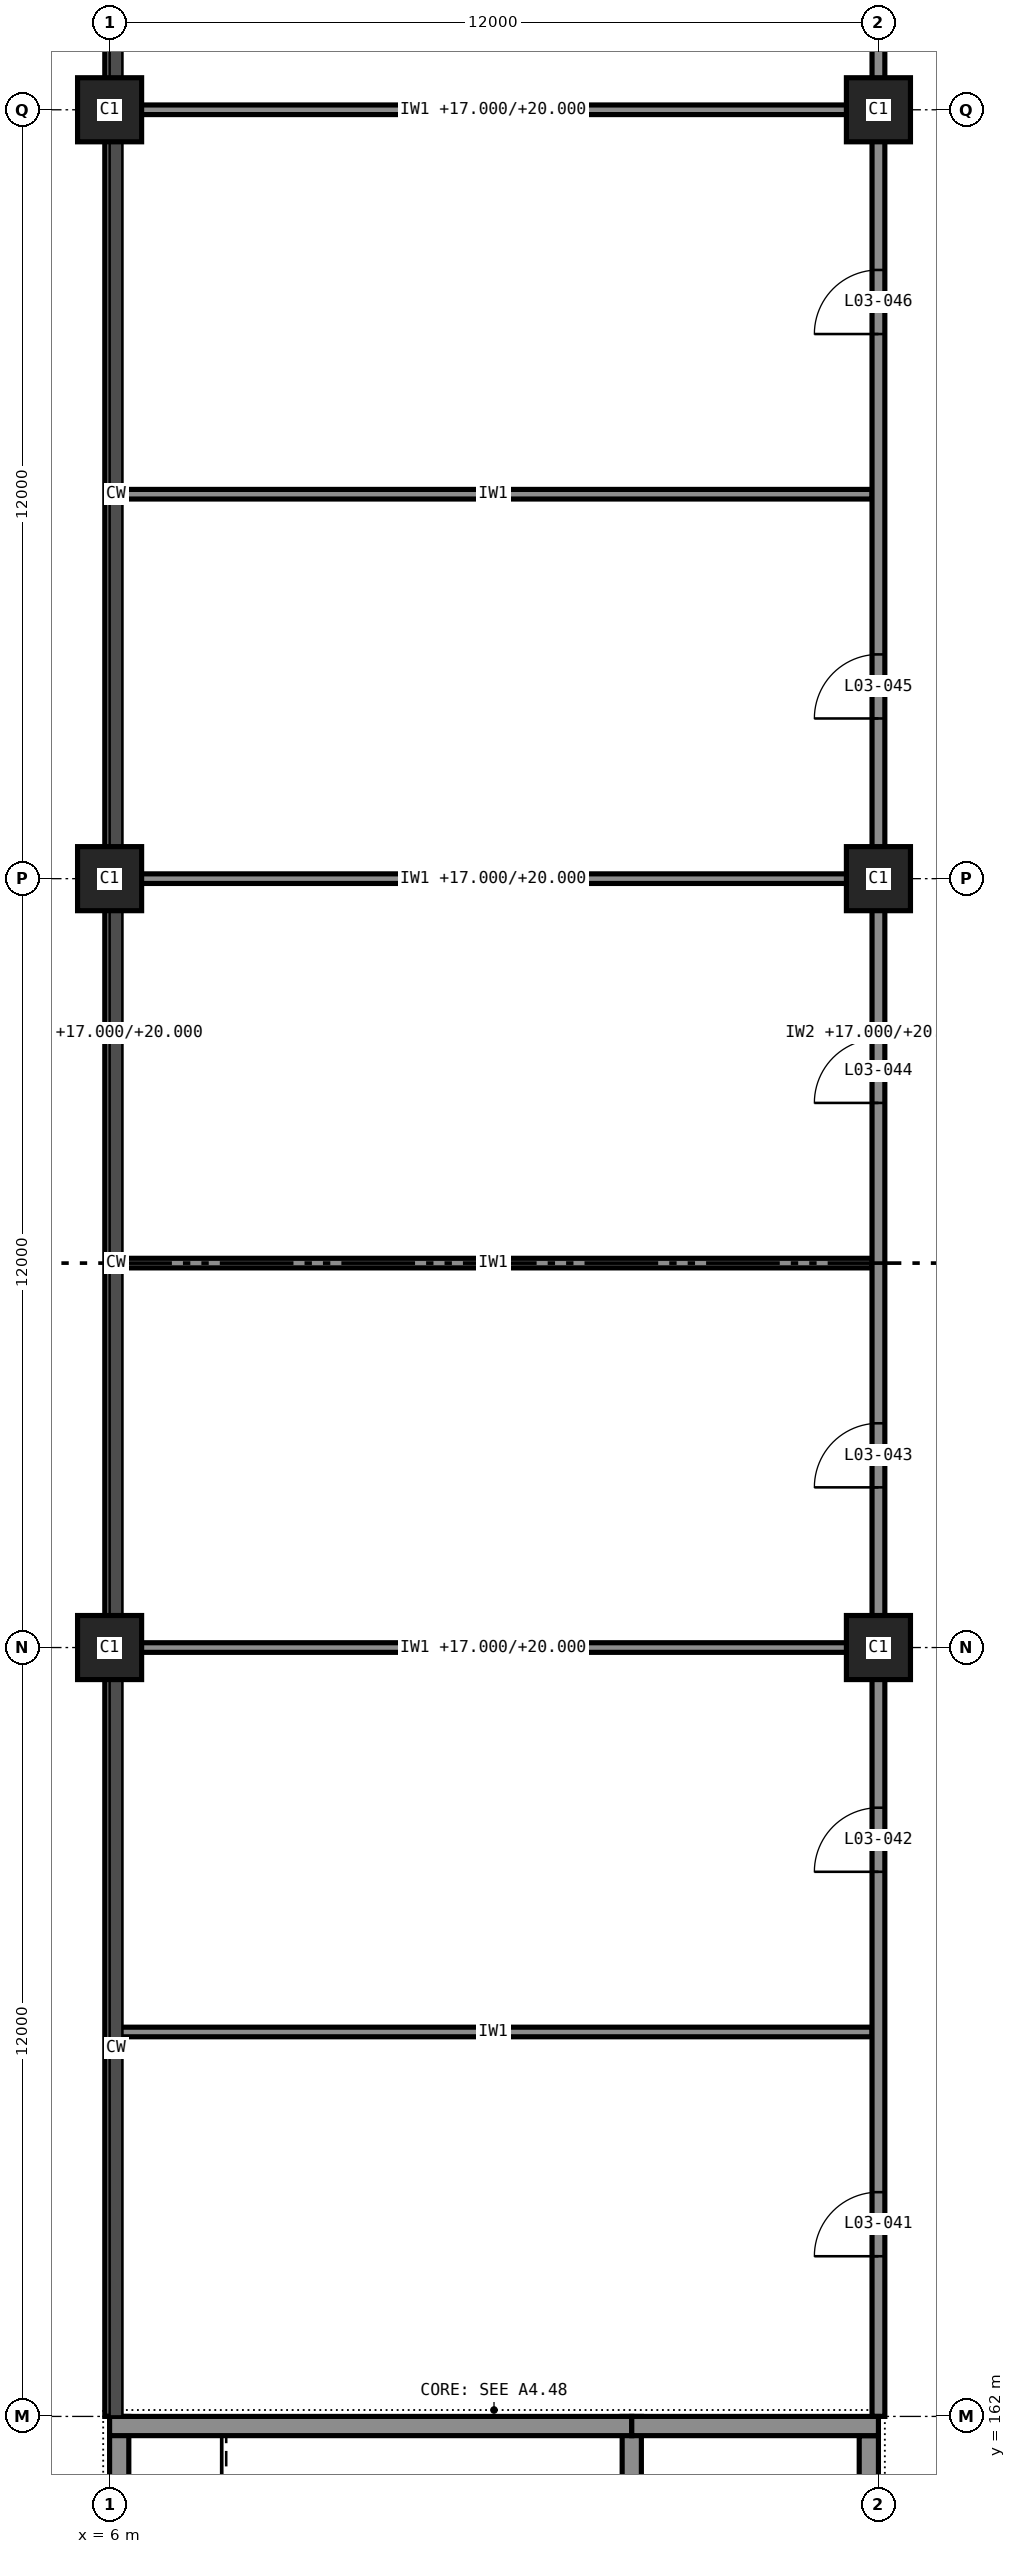
"""IFC4 building model, lengths in metres.
Left out: names, types, materials, properties, quantities, classifications, styles, units other than length and angle.
Written with IfcOpenShell. Run it as: python <this file> out.ifc"""

import sys

from ifc_helpers import new_model, si_unit, direction, frame, frame_2d, origin, origin_2d, place, context, subcontext, project, spatial, rectangle, extrude, element, fill, save


model = new_model("IFC4")
c1 = context("Model", 3, precision=1e-05, world=origin(), true_north=direction((0.0, 1.0)))
c2 = subcontext(c1, "Body", "Model", "MODEL_VIEW")
j1 = project(units=[si_unit("LENGTHUNIT", "METRE"), si_unit("PLANEANGLEUNIT", "RADIAN")], contexts=[c1])
p1 = place(None, origin())
s1 = spatial("IfcSite", under=j1, at=p1, CompositionType="ELEMENT")
p2 = place(p1, origin())
s2 = spatial("IfcBuilding", under=s1, at=p2, CompositionType="ELEMENT")
p3 = place(p2, frame((0.0, 0.0, 17.0)))
s3 = spatial("IfcBuildingStorey", under=s2, at=p3, CompositionType="ELEMENT", Elevation=17.0)
for number, where, z_axis, x_axis in (
    (1, (6.0, 174.0, 0.0), (0.0, 0.0, 1.0), (1.0, 0.0, 0.0)),
    (2, (6.0, 186.0, 0.0), (0.0, 0.0, 1.0), (1.0, 0.0, 0.0)),
    (3, (6.0, 198.0, 0.0), (0.0, 0.0, 1.0), (1.0, 0.0, 0.0)),
    (4, (18.0, 174.0, 0.0), (0.0, 0.0, 1.0), (1.0, 0.0, 0.0)),
    (5, (18.0, 186.0, 0.0), (0.0, 0.0, 1.0), (1.0, 0.0, 0.0)),
    (6, (18.0, 198.0, 0.0), (0.0, 0.0, 1.0), (1.0, 0.0, 0.0)),
):
    element("IfcColumn", number, at=place(p3, frame(where, z_axis=z_axis, x_axis=x_axis)), inside=s3, PredefinedType="COLUMN", context=c2, shape_type="SweptSolid", body=[
        extrude(rectangle(XDim=1.0, YDim=1.0, at=origin_2d()), origin(), (0.0, 0.0, 1.0), 4.0),
    ])
p4 = place(p3, frame((6.0, 161.85, 0.0), z_axis=(0.0, 0.0, 1.0), x_axis=(1.0, 0.0, 0.0)))
e7 = element("IfcWall", 7, at=p4, inside=s3, PredefinedType="SHEAR", context=c2, shape_type="SweptSolid", body=[
    extrude(rectangle(XDim=8.15, YDim=0.3, at=frame_2d((4.075, 0.0))), origin(), (0.0, 0.0, 1.0), 3.8),
])
p5 = place(p3, frame((14.15, 161.85, 0.0), z_axis=(0.0, 0.0, 1.0), x_axis=(1.0, 0.0, 0.0)))
e8 = element("IfcWall", 8, at=p5, inside=s3, PredefinedType="SHEAR", context=c2, shape_type="SweptSolid", body=[
    extrude(rectangle(XDim=3.85, YDim=0.3, at=frame_2d((1.925, 0.0))), origin(), (0.0, 0.0, 1.0), 3.8),
])
p6 = place(p3, frame((6.15, 158.55, 0.0), z_axis=(0.0, 0.0, 1.0), x_axis=(0.0, 1.0, 0.0)))
e9 = element("IfcWall", 9, at=p6, inside=s3, PredefinedType="SHEAR", context=c2, shape_type="SweptSolid", body=[
    extrude(rectangle(XDim=3.45, YDim=0.3, at=frame_2d((1.725, 0.0))), origin(), (0.0, 0.0, 1.0), 3.8),
])
p7 = place(p3, frame((17.85, 158.55, 0.0), z_axis=(0.0, 0.0, 1.0), x_axis=(0.0, 1.0, 0.0)))
e10 = element("IfcWall", 10, at=p7, inside=s3, PredefinedType="SHEAR", context=c2, shape_type="SweptSolid", body=[
    extrude(rectangle(XDim=3.15, YDim=0.3, at=frame_2d((1.575, 0.0))), origin(), (0.0, 0.0, 1.0), 3.8),
])
p8 = place(p7, frame((1.15, 0.0, 0.0)))
e11 = element("IfcOpeningElement", 11, at=p8, cuts=e10, PredefinedType="OPENING", context=c2, shape_type="SweptSolid", body=[
    extrude(rectangle(XDim=1.0, YDim=2.1, at=frame_2d((0.5, 1.05))), frame((0.0, 0.16, 0.0), z_axis=(0.0, -1.0, 0.0), x_axis=(1.0, 0.0, 0.0)), (0.0, 0.0, 1.0), 0.32),
])
p9 = place(p3, frame((14.15, 158.7, 0.0), z_axis=(0.0, 0.0, 1.0), x_axis=(0.0, 1.0, 0.0)))
e12 = element("IfcWall", 12, at=p9, inside=s3, PredefinedType="SHEAR", context=c2, shape_type="SweptSolid", body=[
    extrude(rectangle(XDim=3.3, YDim=0.3, at=frame_2d((1.65, 0.0))), origin(), (0.0, 0.0, 1.0), 3.8),
])
p10 = place(p3, frame((6.075, 168.0, 0.0), z_axis=(0.0, 0.0, 1.0), x_axis=(1.0, 0.0, 0.0)))
e13 = element("IfcWall", 13, at=p10, inside=s3, PredefinedType="PARTITIONING", context=c2, shape_type="SweptSolid", body=[
    extrude(rectangle(XDim=11.825, YDim=0.15, at=frame_2d((5.913, 0.0))), origin(), (0.0, 0.0, 1.0), 3.8),
])
p11 = place(p3, frame((6.075, 174.0, 0.0), z_axis=(0.0, 0.0, 1.0), x_axis=(1.0, 0.0, 0.0)))
e14 = element("IfcWall", 14, at=p11, inside=s3, PredefinedType="PARTITIONING", context=c2, shape_type="SweptSolid", body=[
    extrude(rectangle(XDim=11.825, YDim=0.15, at=frame_2d((5.913, 0.0))), origin(), (0.0, 0.0, 1.0), 3.0),
])
p12 = place(p3, frame((6.075, 180.0, 0.0), z_axis=(0.0, 0.0, 1.0), x_axis=(1.0, 0.0, 0.0)))
e15 = element("IfcWall", 15, at=p12, inside=s3, PredefinedType="PARTITIONING", context=c2, shape_type="SweptSolid", body=[
    extrude(rectangle(XDim=11.825, YDim=0.15, at=frame_2d((5.913, 0.0))), origin(), (0.0, 0.0, 1.0), 3.8),
])
p13 = place(p3, frame((6.075, 186.0, 0.0), z_axis=(0.0, 0.0, 1.0), x_axis=(1.0, 0.0, 0.0)))
e16 = element("IfcWall", 16, at=p13, inside=s3, PredefinedType="PARTITIONING", context=c2, shape_type="SweptSolid", body=[
    extrude(rectangle(XDim=11.825, YDim=0.15, at=frame_2d((5.913, 0.0))), origin(), (0.0, 0.0, 1.0), 3.0),
])
p14 = place(p3, frame((6.075, 192.0, 0.0), z_axis=(0.0, 0.0, 1.0), x_axis=(1.0, 0.0, 0.0)))
e17 = element("IfcWall", 17, at=p14, inside=s3, PredefinedType="PARTITIONING", context=c2, shape_type="SweptSolid", body=[
    extrude(rectangle(XDim=11.825, YDim=0.15, at=frame_2d((5.913, 0.0))), origin(), (0.0, 0.0, 1.0), 3.8),
])
p15 = place(p3, frame((6.075, 198.0, 0.0), z_axis=(0.0, 0.0, 1.0), x_axis=(1.0, 0.0, 0.0)))
e18 = element("IfcWall", 18, at=p15, inside=s3, PredefinedType="PARTITIONING", context=c2, shape_type="SweptSolid", body=[
    extrude(rectangle(XDim=11.825, YDim=0.15, at=frame_2d((5.913, 0.0))), origin(), (0.0, 0.0, 1.0), 3.0),
])
p16 = place(p3, frame((6.0, 162.0, 0.0), z_axis=(0.0, 0.0, 1.0), x_axis=(0.0, 1.0, 0.0)))
e19 = element("IfcWall", 19, at=p16, inside=s3, PredefinedType="PARTITIONING", context=c2, shape_type="SweptSolid", body=[
    extrude(rectangle(XDim=48.0, YDim=0.15, at=frame_2d((24.0, 0.0))), origin(), (0.0, 0.0, 1.0), 3.0),
])
p17 = place(p3, frame((18.0, 162.0, 0.0), z_axis=(0.0, 0.0, 1.0), x_axis=(0.0, 1.0, 0.0)))
e20 = element("IfcWall", 20, at=p17, inside=s3, PredefinedType="PARTITIONING", context=c2, shape_type="SweptSolid", body=[
    extrude(rectangle(XDim=48.0, YDim=0.2, at=frame_2d((24.0, 0.0))), origin(), (0.0, 0.0, 1.0), 3.0),
])
p18 = place(p17, frame((2.5, 0.0, 0.0)))
e21 = element("IfcOpeningElement", 21, at=p18, cuts=e20, PredefinedType="OPENING", context=c2, shape_type="SweptSolid", body=[
    extrude(rectangle(XDim=1.0, YDim=2.1, at=frame_2d((0.5, 1.05))), frame((0.0, 0.11, 0.0), z_axis=(0.0, -1.0, 0.0), x_axis=(1.0, 0.0, 0.0)), (0.0, 0.0, 1.0), 0.22),
])
p19 = place(p17, frame((8.5, 0.0, 0.0)))
e22 = element("IfcOpeningElement", 22, at=p19, cuts=e20, PredefinedType="OPENING", context=c2, shape_type="SweptSolid", body=[
    extrude(rectangle(XDim=1.0, YDim=2.1, at=frame_2d((0.5, 1.05))), frame((0.0, 0.11, 0.0), z_axis=(0.0, -1.0, 0.0), x_axis=(1.0, 0.0, 0.0)), (0.0, 0.0, 1.0), 0.22),
])
p20 = place(p17, frame((14.5, 0.0, 0.0)))
e23 = element("IfcOpeningElement", 23, at=p20, cuts=e20, PredefinedType="OPENING", context=c2, shape_type="SweptSolid", body=[
    extrude(rectangle(XDim=1.0, YDim=2.1, at=frame_2d((0.5, 1.05))), frame((0.0, 0.11, 0.0), z_axis=(0.0, -1.0, 0.0), x_axis=(1.0, 0.0, 0.0)), (0.0, 0.0, 1.0), 0.22),
])
p21 = place(p17, frame((20.5, 0.0, 0.0)))
e24 = element("IfcOpeningElement", 24, at=p21, cuts=e20, PredefinedType="OPENING", context=c2, shape_type="SweptSolid", body=[
    extrude(rectangle(XDim=1.0, YDim=2.1, at=frame_2d((0.5, 1.05))), frame((0.0, 0.11, 0.0), z_axis=(0.0, -1.0, 0.0), x_axis=(1.0, 0.0, 0.0)), (0.0, 0.0, 1.0), 0.22),
])
p22 = place(p17, frame((26.5, 0.0, 0.0)))
e25 = element("IfcOpeningElement", 25, at=p22, cuts=e20, PredefinedType="OPENING", context=c2, shape_type="SweptSolid", body=[
    extrude(rectangle(XDim=1.0, YDim=2.1, at=frame_2d((0.5, 1.05))), frame((0.0, 0.11, 0.0), z_axis=(0.0, -1.0, 0.0), x_axis=(1.0, 0.0, 0.0)), (0.0, 0.0, 1.0), 0.22),
])
p23 = place(p17, frame((32.5, 0.0, 0.0)))
e26 = element("IfcOpeningElement", 26, at=p23, cuts=e20, PredefinedType="OPENING", context=c2, shape_type="SweptSolid", body=[
    extrude(rectangle(XDim=1.0, YDim=2.1, at=frame_2d((0.5, 1.05))), frame((0.0, 0.11, 0.0), z_axis=(0.0, -1.0, 0.0), x_axis=(1.0, 0.0, 0.0)), (0.0, 0.0, 1.0), 0.22),
])
p24 = place(p17, frame((38.5, 0.0, 0.0)))
e27 = element("IfcOpeningElement", 27, at=p24, cuts=e20, PredefinedType="OPENING", context=c2, shape_type="SweptSolid", body=[
    extrude(rectangle(XDim=1.0, YDim=2.1, at=frame_2d((0.5, 1.05))), frame((0.0, 0.11, 0.0), z_axis=(0.0, -1.0, 0.0), x_axis=(1.0, 0.0, 0.0)), (0.0, 0.0, 1.0), 0.22),
])
p25 = place(p17, frame((44.5, 0.0, 0.0)))
e28 = element("IfcOpeningElement", 28, at=p25, cuts=e20, PredefinedType="OPENING", context=c2, shape_type="SweptSolid", body=[
    extrude(rectangle(XDim=1.0, YDim=2.1, at=frame_2d((0.5, 1.05))), frame((0.0, 0.11, 0.0), z_axis=(0.0, -1.0, 0.0), x_axis=(1.0, 0.0, 0.0)), (0.0, 0.0, 1.0), 0.22),
])
p26 = place(p18, origin())
e29 = element("IfcDoor", 29, at=p26, inside=s3, OperationType="SINGLE_SWING_RIGHT", PredefinedType="DOOR", context=c2, shape_type="SweptSolid", body=[
    extrude(rectangle(XDim=1.0, YDim=2.1, at=frame_2d((0.5, 1.05))), frame((0.0, 0.025, 0.0), z_axis=(0.0, -1.0, 0.0), x_axis=(1.0, 0.0, 0.0)), (0.0, 0.0, 1.0), 0.05),
])
fill(e21, e29)
p27 = place(p19, origin())
e30 = element("IfcDoor", 30, at=p27, inside=s3, OperationType="SINGLE_SWING_RIGHT", PredefinedType="DOOR", context=c2, shape_type="SweptSolid", body=[
    extrude(rectangle(XDim=1.0, YDim=2.1, at=frame_2d((0.5, 1.05))), frame((0.0, 0.025, 0.0), z_axis=(0.0, -1.0, 0.0), x_axis=(1.0, 0.0, 0.0)), (0.0, 0.0, 1.0), 0.05),
])
fill(e22, e30)
p28 = place(p20, origin())
e31 = element("IfcDoor", 31, at=p28, inside=s3, OperationType="SINGLE_SWING_RIGHT", PredefinedType="DOOR", context=c2, shape_type="SweptSolid", body=[
    extrude(rectangle(XDim=1.0, YDim=2.1, at=frame_2d((0.5, 1.05))), frame((0.0, 0.025, 0.0), z_axis=(0.0, -1.0, 0.0), x_axis=(1.0, 0.0, 0.0)), (0.0, 0.0, 1.0), 0.05),
])
fill(e23, e31)
p29 = place(p21, origin())
e32 = element("IfcDoor", 32, at=p29, inside=s3, OperationType="SINGLE_SWING_RIGHT", PredefinedType="DOOR", context=c2, shape_type="SweptSolid", body=[
    extrude(rectangle(XDim=1.0, YDim=2.1, at=frame_2d((0.5, 1.05))), frame((0.0, 0.025, 0.0), z_axis=(0.0, -1.0, 0.0), x_axis=(1.0, 0.0, 0.0)), (0.0, 0.0, 1.0), 0.05),
])
fill(e24, e32)
p30 = place(p22, origin())
e33 = element("IfcDoor", 33, at=p30, inside=s3, OperationType="SINGLE_SWING_RIGHT", PredefinedType="DOOR", context=c2, shape_type="SweptSolid", body=[
    extrude(rectangle(XDim=1.0, YDim=2.1, at=frame_2d((0.5, 1.05))), frame((0.0, 0.025, 0.0), z_axis=(0.0, -1.0, 0.0), x_axis=(1.0, 0.0, 0.0)), (0.0, 0.0, 1.0), 0.05),
])
fill(e25, e33)
p31 = place(p23, origin())
e34 = element("IfcDoor", 34, at=p31, inside=s3, OperationType="SINGLE_SWING_RIGHT", PredefinedType="DOOR", context=c2, shape_type="SweptSolid", body=[
    extrude(rectangle(XDim=1.0, YDim=2.1, at=frame_2d((0.5, 1.05))), frame((0.0, 0.025, 0.0), z_axis=(0.0, -1.0, 0.0), x_axis=(1.0, 0.0, 0.0)), (0.0, 0.0, 1.0), 0.05),
])
fill(e26, e34)
save(model, sys.argv[1])
